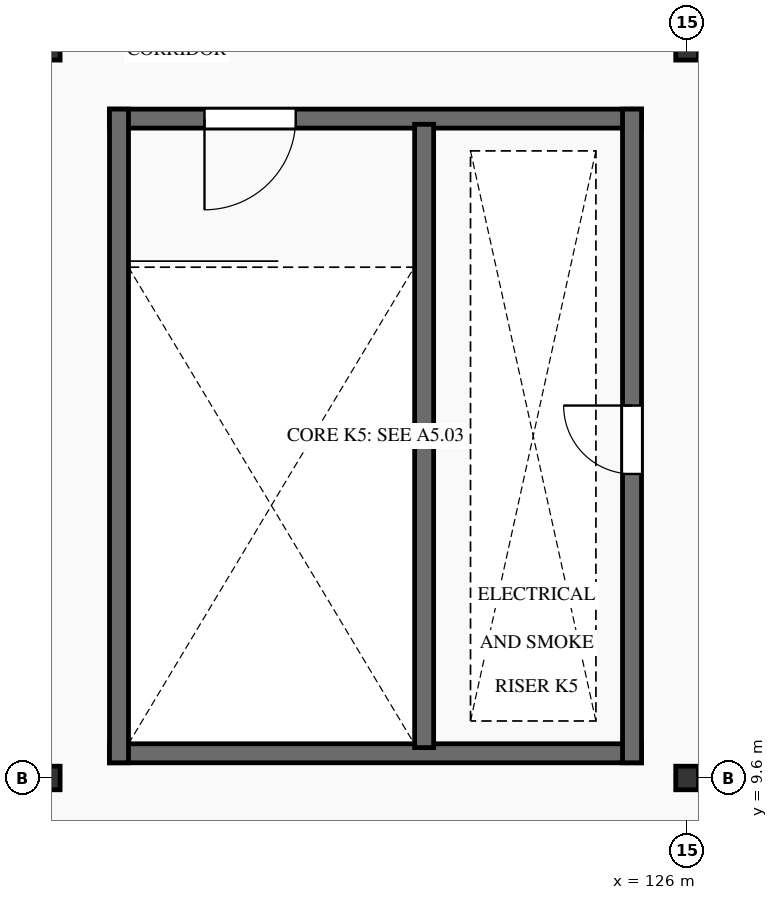
"""IFC4 building model, lengths in metres.
Left out: names, types, materials, properties, quantities, classifications, styles, units other than length and angle.
Written with IfcOpenShell. Run it as: python <this file> out.ifc"""

import sys

from ifc_helpers import new_model, si_unit, direction, frame, frame_2d, origin, origin_2d, place, context, subcontext, project, spatial, rectangle, i_section, extrude, element, fill, save


model = new_model("IFC4")
c1 = context("Model", 3, precision=1e-05, world=origin(), true_north=direction((0.0, 1.0)))
c2 = subcontext(c1, "Body", "Model", "MODEL_VIEW")
j1 = project(units=[si_unit("LENGTHUNIT", "METRE"), si_unit("PLANEANGLEUNIT", "RADIAN")], contexts=[c1])
p1 = place(None, origin())
s1 = spatial("IfcSite", under=j1, at=p1, CompositionType="ELEMENT")
p2 = place(p1, origin())
s2 = spatial("IfcBuilding", under=s1, at=p2, CompositionType="ELEMENT")
p3 = place(p2, frame((0.0, 0.0, 15.0)))
s3 = spatial("IfcBuildingStorey", under=s2, at=p3, CompositionType="ELEMENT", Elevation=15.0)
for number, where, z_axis, x_axis in (
    (1, (117.6, 9.6, 0.0), (0.0, 0.0, 1.0), (1.0, 0.0, 0.0)),
    (2, (117.6, 19.2, 0.0), (0.0, 0.0, 1.0), (1.0, 0.0, 0.0)),
    (3, (126.0, 9.6, 0.0), (0.0, 0.0, 1.0), (1.0, 0.0, 0.0)),
    (4, (126.0, 19.2, 0.0), (0.0, 0.0, 1.0), (1.0, 0.0, 0.0)),
):
    element("IfcColumn", number, at=place(p3, frame(where, z_axis=z_axis, x_axis=x_axis)), inside=s3, PredefinedType="COLUMN", context=c2, shape_type="SweptSolid", body=[
        extrude(i_section(OverallWidth=0.3, OverallDepth=0.31, WebThickness=0.009, FlangeThickness=0.015, FilletRadius=0.027, at=origin_2d()), origin(), (0.0, 0.0, 1.0), 3.9),
    ])
p4 = place(p3, frame((118.4, 9.925, 0.0), z_axis=(0.0, 0.0, 1.0), x_axis=(1.0, 0.0, 0.0)))
e5 = element("IfcWall", 5, at=p4, inside=s3, PredefinedType="SHEAR", context=c2, shape_type="SweptSolid", body=[
    extrude(rectangle(XDim=7.0, YDim=0.25, at=frame_2d((3.5, 0.0))), origin(), (0.0, 0.0, 1.0), 3.9),
])
p5 = place(p3, frame((118.4, 18.275, 0.0), z_axis=(0.0, 0.0, 1.0), x_axis=(1.0, 0.0, 0.0)))
e6 = element("IfcWall", 6, at=p5, inside=s3, PredefinedType="SHEAR", context=c2, shape_type="SweptSolid", body=[
    extrude(rectangle(XDim=7.0, YDim=0.25, at=frame_2d((3.5, 0.0))), origin(), (0.0, 0.0, 1.0), 3.9),
])
p6 = place(p5, frame((1.25, 0.0, 0.0)))
e7 = element("IfcOpeningElement", 7, at=p6, cuts=e6, PredefinedType="OPENING", context=c2, shape_type="SweptSolid", body=[
    extrude(rectangle(XDim=1.2, YDim=2.15, at=frame_2d((0.6, 1.075))), frame((0.0, 0.14, 0.0), z_axis=(0.0, -1.0, 0.0), x_axis=(1.0, 0.0, 0.0)), (0.0, 0.0, 1.0), 0.28),
])
p7 = place(p3, frame((118.525, 9.8, 0.0), z_axis=(0.0, 0.0, 1.0), x_axis=(0.0, 1.0, 0.0)))
e8 = element("IfcWall", 8, at=p7, inside=s3, PredefinedType="SHEAR", context=c2, shape_type="SweptSolid", body=[
    extrude(rectangle(XDim=8.6, YDim=0.25, at=frame_2d((4.3, 0.0))), origin(), (0.0, 0.0, 1.0), 3.9),
])
p8 = place(p3, frame((125.275, 9.8, 0.0), z_axis=(0.0, 0.0, 1.0), x_axis=(0.0, 1.0, 0.0)))
e9 = element("IfcWall", 9, at=p8, inside=s3, PredefinedType="SHEAR", context=c2, shape_type="SweptSolid", body=[
    extrude(rectangle(XDim=8.6, YDim=0.25, at=frame_2d((4.3, 0.0))), origin(), (0.0, 0.0, 1.0), 3.9),
])
p9 = place(p8, frame((3.8, 0.0, 0.0)))
e10 = element("IfcOpeningElement", 10, at=p9, cuts=e9, PredefinedType="OPENING", context=c2, shape_type="SweptSolid", body=[
    extrude(rectangle(XDim=0.9, YDim=2.05, at=frame_2d((0.45, 1.025))), frame((0.0, 0.14, 0.0), z_axis=(0.0, -1.0, 0.0), x_axis=(1.0, 0.0, 0.0)), (0.0, 0.0, 1.0), 0.28),
])
p10 = place(p3, frame((122.54, 10.0, 0.0), z_axis=(0.0, 0.0, 1.0), x_axis=(0.0, 1.0, 0.0)))
e11 = element("IfcWall", 11, at=p10, inside=s3, PredefinedType="SHEAR", context=c2, shape_type="SweptSolid", body=[
    extrude(rectangle(XDim=8.2, YDim=0.25, at=frame_2d((4.1, 0.0))), origin(), (0.0, 0.0, 1.0), 3.9),
])
p11 = place(p6, frame((1.2, 0.0, 0.0), z_axis=(0.0, 0.0, 1.0), x_axis=(-1.0, 0.0, 0.0)))
e12 = element("IfcDoor", 12, at=p11, inside=s3, OperationType="SINGLE_SWING_LEFT", PredefinedType="DOOR", context=c2, shape_type="SweptSolid", body=[
    extrude(rectangle(XDim=1.2, YDim=2.15, at=frame_2d((0.6, 1.075))), frame((0.0, 0.025, 0.0), z_axis=(0.0, -1.0, 0.0), x_axis=(1.0, 0.0, 0.0)), (0.0, 0.0, 1.0), 0.05),
])
fill(e7, e12)
p12 = place(p9, origin())
e13 = element("IfcDoor", 13, at=p12, inside=s3, OperationType="SINGLE_SWING_RIGHT", PredefinedType="DOOR", context=c2, shape_type="SweptSolid", body=[
    extrude(rectangle(XDim=0.9, YDim=2.05, at=frame_2d((0.45, 1.025))), frame((0.0, 0.025, 0.0), z_axis=(0.0, -1.0, 0.0), x_axis=(1.0, 0.0, 0.0)), (0.0, 0.0, 1.0), 0.05),
])
fill(e10, e13)
save(model, sys.argv[1])
